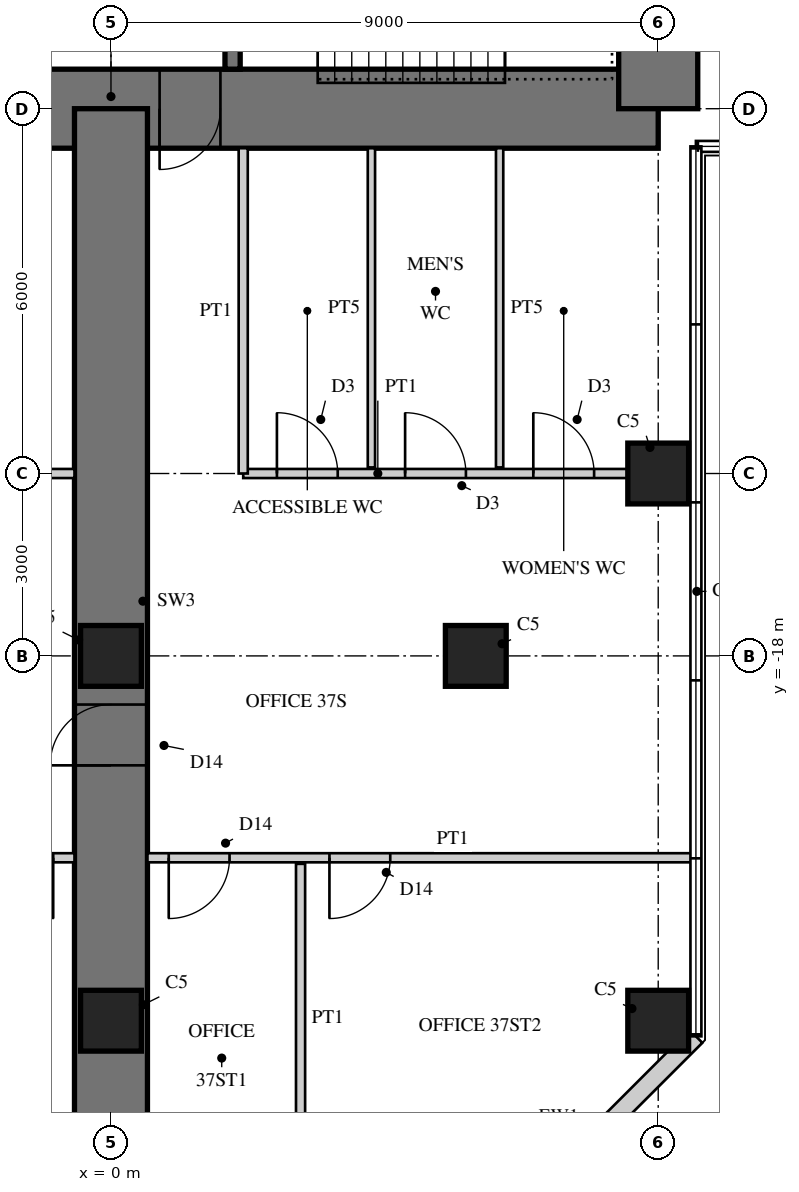
"""IFC4 building model, lengths in metres.
Left out: names, types, materials, properties, quantities, classifications, styles, units other than length and angle.
Written with IfcOpenShell. Run it as: python <this file> out.ifc"""

import sys

from ifc_helpers import new_model, si_unit, direction, frame, frame_2d, origin, origin_2d, place, context, subcontext, project, spatial, rectangle, extrude, element, fill, save


model = new_model("IFC4")
c1 = context("Model", 3, precision=1e-05, world=origin(), true_north=direction((0.0, 1.0)))
c2 = subcontext(c1, "Body", "Model", "MODEL_VIEW")
j1 = project(units=[si_unit("LENGTHUNIT", "METRE"), si_unit("PLANEANGLEUNIT", "RADIAN")], contexts=[c1])
p1 = place(None, origin())
s1 = spatial("IfcSite", under=j1, at=p1, CompositionType="ELEMENT")
p2 = place(p1, origin())
s2 = spatial("IfcBuilding", under=s1, at=p2, CompositionType="ELEMENT")
p3 = place(p2, frame((0.0, 0.0, 152.5)))
s3 = spatial("IfcBuildingStorey", under=s2, at=p3, CompositionType="ELEMENT", Elevation=152.5)
p4 = place(p3, frame((-9.0, -9.0, 0.0), z_axis=(0.0, 0.0, 1.0), x_axis=(1.0, 0.0, 0.0)))
e1 = element("IfcWall", 1, at=p4, inside=s3, PredefinedType="SHEAR", context=c2, shape_type="SweptSolid", body=[
    extrude(rectangle(XDim=18.0, YDim=1.3, at=frame_2d((9.0, 0.0))), origin(), (0.0, 0.0, 1.0), 4.0),
])
p5 = place(p4, frame((9.8, 0.0, 0.0)))
e2 = element("IfcOpeningElement", 2, at=p5, cuts=e1, PredefinedType="OPENING", context=c2, shape_type="SweptSolid", body=[
    extrude(rectangle(XDim=1.0, YDim=2.4, at=frame_2d((0.5, 1.2))), frame((0.0, 0.66, 0.0), z_axis=(0.0, -1.0, 0.0), x_axis=(1.0, 0.0, 0.0)), (0.0, 0.0, 1.0), 1.32),
])
p6 = place(p3, frame((9.0, -9.0, 0.0), z_axis=(0.0, 0.0, 1.0), x_axis=(0.0, 1.0, 0.0)))
e3 = element("IfcWall", 3, at=p6, inside=s3, PredefinedType="SHEAR", context=c2, shape_type="SweptSolid", body=[
    extrude(rectangle(XDim=18.0, YDim=1.3, at=frame_2d((9.0, 0.0))), origin(), (0.0, 0.0, 1.0), 4.0),
])
p7 = place(p6, frame((9.8, 0.0, 0.0)))
e4 = element("IfcOpeningElement", 4, at=p7, cuts=e3, PredefinedType="OPENING", context=c2, shape_type="SweptSolid", body=[
    extrude(rectangle(XDim=1.0, YDim=2.4, at=frame_2d((0.5, 1.2))), frame((0.0, 0.66, 0.0), z_axis=(0.0, -1.0, 0.0), x_axis=(1.0, 0.0, 0.0)), (0.0, 0.0, 1.0), 1.32),
])
p8 = place(p3, frame((2.0, -1.675, 0.0), z_axis=(0.0, 0.0, 1.0), x_axis=(0.0, -1.0, 0.0)))
e5 = element("IfcWall", 5, at=p8, inside=s3, PredefinedType="SHEAR", context=c2, shape_type="SweptSolid", body=[
    extrude(rectangle(XDim=6.675, YDim=0.25, at=frame_2d((3.337, 0.0))), origin(), (0.0, 0.0, 1.0), 4.0),
])
p9 = place(p8, frame((0.725, 0.0, 0.0)))
e6 = element("IfcOpeningElement", 6, at=p9, cuts=e5, PredefinedType="OPENING", context=c2, shape_type="SweptSolid", body=[
    extrude(rectangle(XDim=1.0, YDim=2.1, at=frame_2d((0.5, 1.05))), frame((0.0, 0.135, 0.0), z_axis=(0.0, -1.0, 0.0), x_axis=(1.0, 0.0, 0.0)), (0.0, 0.0, 1.0), 0.27),
])
p10 = place(p3, frame((0.0, -9.0, 0.0), z_axis=(0.0, 0.0, 1.0), x_axis=(0.0, -1.0, 0.0)))
e7 = element("IfcWall", 7, at=p10, inside=s3, PredefinedType="SHEAR", context=c2, shape_type="SweptSolid", body=[
    extrude(rectangle(XDim=18.0, YDim=1.2, at=frame_2d((9.0, 0.0))), origin(), (0.0, 0.0, 1.0), 4.0),
])
p11 = place(p10, frame((9.8, 0.0, 0.0)))
e8 = element("IfcOpeningElement", 8, at=p11, cuts=e7, PredefinedType="OPENING", context=c2, shape_type="SweptSolid", body=[
    extrude(rectangle(XDim=1.0, YDim=2.2, at=frame_2d((0.5, 1.1))), frame((0.0, 0.61, 0.0), z_axis=(0.0, -1.0, 0.0), x_axis=(1.0, 0.0, 0.0)), (0.0, 0.0, 1.0), 1.22),
])
for number, where, z_axis, x_axis in (
    (9, (9.0, -15.0, 0.0), (0.0, 0.0, 1.0), (1.0, 0.0, 0.0)),
    (10, (9.0, -24.0, 0.0), (0.0, 0.0, 1.0), (1.0, 0.0, 0.0)),
    (11, (0.0, -18.0, 0.0), (0.0, 0.0, 1.0), (1.0, 0.0, 0.0)),
    (12, (6.0, -18.0, 0.0), (0.0, 0.0, 1.0), (1.0, 0.0, 0.0)),
    (13, (0.0, -24.0, 0.0), (0.0, 0.0, 1.0), (1.0, 0.0, 0.0)),
):
    element("IfcColumn", number, at=place(p3, frame(where, z_axis=z_axis, x_axis=x_axis)), inside=s3, PredefinedType="COLUMN", context=c2, shape_type="SweptSolid", body=[
        extrude(rectangle(XDim=1.0, YDim=1.0, at=origin_2d()), origin(), (0.0, 0.0, 1.0), 4.0),
    ])
p12 = place(p3, frame((6.277, -27.6, 0.0), z_axis=(0.0, 0.0, 1.0), x_axis=(0.707106781187, 0.707106781187, 0.0)))
e14 = element("IfcWall", 14, at=p12, inside=s3, PredefinedType="SOLIDWALL", context=c2, shape_type="SweptSolid", body=[
    extrude(rectangle(XDim=4.728, YDim=0.3, at=frame_2d((2.364, 0.0))), origin(), (0.0, 0.0, 1.0), 3.8),
])
p13 = place(p12, frame((1.914, 0.0, 0.3)))
e15 = element("IfcOpeningElement", 15, at=p13, cuts=e14, PredefinedType="OPENING", context=c2, shape_type="SweptSolid", body=[
    extrude(rectangle(XDim=0.9, YDim=2.4, at=frame_2d((0.45, 1.2))), frame((0.0, 0.16, 0.0), z_axis=(0.0, -1.0, 0.0), x_axis=(1.0, 0.0, 0.0)), (0.0, 0.0, 1.0), 0.32),
])
p14 = place(p3, frame((2.175, -15.0, 0.0), z_axis=(0.0, 0.0, 1.0), x_axis=(1.0, 0.0, 0.0)))
e16 = element("IfcWall", 16, at=p14, inside=s3, PredefinedType="PARTITIONING", context=c2, shape_type="SweptSolid", body=[
    extrude(rectangle(XDim=6.325, YDim=0.15, at=frame_2d((3.163, 0.0))), origin(), (0.0, 0.0, 1.0), 3.0),
])
p15 = place(p14, frame((0.554, 0.0, 0.0)))
e17 = element("IfcOpeningElement", 17, at=p15, cuts=e16, PredefinedType="OPENING", context=c2, shape_type="SweptSolid", body=[
    extrude(rectangle(XDim=1.0, YDim=2.1, at=frame_2d((0.5, 1.05))), frame((0.0, 0.085, 0.0), z_axis=(0.0, -1.0, 0.0), x_axis=(1.0, 0.0, 0.0)), (0.0, 0.0, 1.0), 0.17),
])
p16 = place(p14, frame((2.663, 0.0, 0.0)))
e18 = element("IfcOpeningElement", 18, at=p16, cuts=e16, PredefinedType="OPENING", context=c2, shape_type="SweptSolid", body=[
    extrude(rectangle(XDim=1.0, YDim=2.1, at=frame_2d((0.5, 1.05))), frame((0.0, 0.085, 0.0), z_axis=(0.0, -1.0, 0.0), x_axis=(1.0, 0.0, 0.0)), (0.0, 0.0, 1.0), 0.17),
])
p17 = place(p14, frame((4.771, 0.0, 0.0)))
e19 = element("IfcOpeningElement", 19, at=p17, cuts=e16, PredefinedType="OPENING", context=c2, shape_type="SweptSolid", body=[
    extrude(rectangle(XDim=1.0, YDim=2.1, at=frame_2d((0.5, 1.05))), frame((0.0, 0.085, 0.0), z_axis=(0.0, -1.0, 0.0), x_axis=(1.0, 0.0, 0.0)), (0.0, 0.0, 1.0), 0.17),
])
p18 = place(p3, frame((2.175, -9.65, 0.0), z_axis=(0.0, 0.0, 1.0), x_axis=(0.0, -1.0, 0.0)))
e20 = element("IfcWall", 20, at=p18, inside=s3, PredefinedType="PARTITIONING", context=c2, shape_type="SweptSolid", body=[
    extrude(rectangle(XDim=5.35, YDim=0.15, at=frame_2d((2.675, 0.0))), origin(), (0.0, 0.0, 1.0), 3.8),
])
for number, where, z_axis, x_axis in (
    (21, (4.283, -9.65, 0.0), (0.0, 0.0, 1.0), (0.0, -1.0, 0.0)),
    (22, (6.392, -9.65, 0.0), (0.0, 0.0, 1.0), (0.0, -1.0, 0.0)),
):
    element("IfcWall", number, at=place(p3, frame(where, z_axis=z_axis, x_axis=x_axis)), inside=s3, PredefinedType="PLUMBINGWALL", context=c2, shape_type="SweptSolid", body=[
        extrude(rectangle(XDim=5.25, YDim=0.12, at=frame_2d((2.625, 0.0))), origin(), (0.0, 0.0, 1.0), 3.8),
    ])
p19 = place(p3, frame((-8.5, -15.0, 0.0), z_axis=(0.0, 0.0, 1.0), x_axis=(1.0, 0.0, 0.0)))
e23 = element("IfcWall", 23, at=p19, inside=s3, PredefinedType="PARTITIONING", context=c2, shape_type="SweptSolid", body=[
    extrude(rectangle(XDim=7.9, YDim=0.15, at=frame_2d((3.95, 0.0))), origin(), (0.0, 0.0, 1.0), 3.0),
])
p20 = place(p19, frame((1.45, 0.0, 0.0)))
e24 = element("IfcOpeningElement", 24, at=p20, cuts=e23, PredefinedType="OPENING", context=c2, shape_type="SweptSolid", body=[
    extrude(rectangle(XDim=1.0, YDim=2.1, at=frame_2d((0.5, 1.05))), frame((0.0, 0.085, 0.0), z_axis=(0.0, -1.0, 0.0), x_axis=(1.0, 0.0, 0.0)), (0.0, 0.0, 1.0), 0.17),
])
p21 = place(p19, frame((5.4, 0.0, 0.0)))
e25 = element("IfcOpeningElement", 25, at=p21, cuts=e23, PredefinedType="OPENING", context=c2, shape_type="SweptSolid", body=[
    extrude(rectangle(XDim=1.0, YDim=2.1, at=frame_2d((0.5, 1.05))), frame((0.0, 0.085, 0.0), z_axis=(0.0, -1.0, 0.0), x_axis=(1.0, 0.0, 0.0)), (0.0, 0.0, 1.0), 0.17),
])
p22 = place(p3, frame((3.118, -21.42, 0.0), z_axis=(0.0, 0.0, 1.0), x_axis=(0.0, -1.0, 0.0)))
e26 = element("IfcWall", 26, at=p22, inside=s3, PredefinedType="PARTITIONING", context=c2, shape_type="SweptSolid", body=[
    extrude(rectangle(XDim=5.08, YDim=0.15, at=frame_2d((2.54, 0.0))), origin(), (0.0, 0.0, 1.0), 3.8),
])
p23 = place(p3, frame((0.6, -21.32, 0.0), z_axis=(0.0, 0.0, 1.0), x_axis=(1.0, 0.0, 0.0)))
e27 = element("IfcWall", 27, at=p23, inside=s3, PredefinedType="PARTITIONING", context=c2, shape_type="SweptSolid", body=[
    extrude(rectangle(XDim=8.98, YDim=0.15, at=frame_2d((4.49, 0.0))), origin(), (0.0, 0.0, 1.0), 3.8),
])
p24 = place(p23, frame((0.35, 0.0, 0.0)))
e28 = element("IfcOpeningElement", 28, at=p24, cuts=e27, PredefinedType="OPENING", context=c2, shape_type="SweptSolid", body=[
    extrude(rectangle(XDim=1.0, YDim=2.2, at=frame_2d((0.5, 1.1))), frame((0.0, 0.085, 0.0), z_axis=(0.0, -1.0, 0.0), x_axis=(1.0, 0.0, 0.0)), (0.0, 0.0, 1.0), 0.17),
])
p25 = place(p23, frame((2.993, 0.0, 0.0)))
e29 = element("IfcOpeningElement", 29, at=p25, cuts=e27, PredefinedType="OPENING", context=c2, shape_type="SweptSolid", body=[
    extrude(rectangle(XDim=1.0, YDim=2.2, at=frame_2d((0.5, 1.1))), frame((0.0, 0.085, 0.0), z_axis=(0.0, -1.0, 0.0), x_axis=(1.0, 0.0, 0.0)), (0.0, 0.0, 1.0), 0.17),
])
p26 = place(p3, frame((-9.58, -21.32, 0.0), z_axis=(0.0, 0.0, 1.0), x_axis=(1.0, 0.0, 0.0)))
e30 = element("IfcWall", 30, at=p26, inside=s3, PredefinedType="PARTITIONING", context=c2, shape_type="SweptSolid", body=[
    extrude(rectangle(XDim=8.98, YDim=0.15, at=frame_2d((4.49, 0.0))), origin(), (0.0, 0.0, 1.0), 3.8),
])
p27 = place(p26, frame((4.987, 0.0, 0.0)))
e31 = element("IfcOpeningElement", 31, at=p27, cuts=e30, PredefinedType="OPENING", context=c2, shape_type="SweptSolid", body=[
    extrude(rectangle(XDim=1.0, YDim=2.2, at=frame_2d((0.5, 1.1))), frame((0.0, 0.085, 0.0), z_axis=(0.0, -1.0, 0.0), x_axis=(1.0, 0.0, 0.0)), (0.0, 0.0, 1.0), 0.17),
])
p28 = place(p26, frame((7.63, 0.0, 0.0)))
e32 = element("IfcOpeningElement", 32, at=p28, cuts=e30, PredefinedType="OPENING", context=c2, shape_type="SweptSolid", body=[
    extrude(rectangle(XDim=1.0, YDim=2.2, at=frame_2d((0.5, 1.1))), frame((0.0, 0.085, 0.0), z_axis=(0.0, -1.0, 0.0), x_axis=(1.0, 0.0, 0.0)), (0.0, 0.0, 1.0), 0.17),
])
p29 = place(p15, origin())
e33 = element("IfcDoor", 33, at=p29, inside=s3, OperationType="SINGLE_SWING_LEFT", PredefinedType="DOOR", context=c2, shape_type="SweptSolid", body=[
    extrude(rectangle(XDim=1.0, YDim=2.1, at=frame_2d((0.5, 1.05))), frame((0.0, 0.025, 0.0), z_axis=(0.0, -1.0, 0.0), x_axis=(1.0, 0.0, 0.0)), (0.0, 0.0, 1.0), 0.05),
])
fill(e17, e33)
p30 = place(p16, origin())
e34 = element("IfcDoor", 34, at=p30, inside=s3, OperationType="SINGLE_SWING_LEFT", PredefinedType="DOOR", context=c2, shape_type="SweptSolid", body=[
    extrude(rectangle(XDim=1.0, YDim=2.1, at=frame_2d((0.5, 1.05))), frame((0.0, 0.025, 0.0), z_axis=(0.0, -1.0, 0.0), x_axis=(1.0, 0.0, 0.0)), (0.0, 0.0, 1.0), 0.05),
])
fill(e18, e34)
p31 = place(p17, origin())
e35 = element("IfcDoor", 35, at=p31, inside=s3, OperationType="SINGLE_SWING_LEFT", PredefinedType="DOOR", context=c2, shape_type="SweptSolid", body=[
    extrude(rectangle(XDim=1.0, YDim=2.1, at=frame_2d((0.5, 1.05))), frame((0.0, 0.025, 0.0), z_axis=(0.0, -1.0, 0.0), x_axis=(1.0, 0.0, 0.0)), (0.0, 0.0, 1.0), 0.05),
])
fill(e19, e35)
p32 = place(p24, frame((1.0, 0.0, 0.0), z_axis=(0.0, 0.0, 1.0), x_axis=(-1.0, 0.0, 0.0)))
e36 = element("IfcDoor", 36, at=p32, inside=s3, OperationType="SINGLE_SWING_RIGHT", PredefinedType="DOOR", context=c2, shape_type="SweptSolid", body=[
    extrude(rectangle(XDim=1.0, YDim=2.2, at=frame_2d((0.5, 1.1))), frame((0.0, 0.025, 0.0), z_axis=(0.0, -1.0, 0.0), x_axis=(1.0, 0.0, 0.0)), (0.0, 0.0, 1.0), 0.05),
])
fill(e28, e36)
p33 = place(p25, frame((1.0, 0.0, 0.0), z_axis=(0.0, 0.0, 1.0), x_axis=(-1.0, 0.0, 0.0)))
e37 = element("IfcDoor", 37, at=p33, inside=s3, OperationType="SINGLE_SWING_RIGHT", PredefinedType="DOOR", context=c2, shape_type="SweptSolid", body=[
    extrude(rectangle(XDim=1.0, YDim=2.2, at=frame_2d((0.5, 1.1))), frame((0.0, 0.025, 0.0), z_axis=(0.0, -1.0, 0.0), x_axis=(1.0, 0.0, 0.0)), (0.0, 0.0, 1.0), 0.05),
])
fill(e29, e37)
p34 = place(p28, frame((1.0, 0.0, 0.0), z_axis=(0.0, 0.0, 1.0), x_axis=(-1.0, 0.0, 0.0)))
e38 = element("IfcDoor", 38, at=p34, inside=s3, OperationType="SINGLE_SWING_LEFT", PredefinedType="DOOR", context=c2, shape_type="SweptSolid", body=[
    extrude(rectangle(XDim=1.0, YDim=2.2, at=frame_2d((0.5, 1.1))), frame((0.0, 0.025, 0.0), z_axis=(0.0, -1.0, 0.0), x_axis=(1.0, 0.0, 0.0)), (0.0, 0.0, 1.0), 0.05),
])
fill(e32, e38)
p35 = place(p11, frame((1.0, 0.0, 0.0), z_axis=(0.0, 0.0, 1.0), x_axis=(-1.0, 0.0, 0.0)))
e39 = element("IfcDoor", 39, at=p35, inside=s3, OperationType="SINGLE_SWING_LEFT", PredefinedType="DOOR", context=c2, shape_type="SweptSolid", body=[
    extrude(rectangle(XDim=1.0, YDim=2.2, at=frame_2d((0.5, 1.1))), frame((0.0, 0.025, 0.0), z_axis=(0.0, -1.0, 0.0), x_axis=(1.0, 0.0, 0.0)), (0.0, 0.0, 1.0), 0.05),
])
fill(e8, e39)
p36 = place(p5, frame((1.0, 0.0, 0.0), z_axis=(0.0, 0.0, 1.0), x_axis=(-1.0, 0.0, 0.0)))
e40 = element("IfcDoor", 40, at=p36, inside=s3, OperationType="SINGLE_SWING_RIGHT", PredefinedType="DOOR", context=c2, shape_type="SweptSolid", body=[
    extrude(rectangle(XDim=1.0, YDim=2.4, at=frame_2d((0.5, 1.2))), frame((0.0, -0.005, 0.0), z_axis=(0.0, -1.0, 0.0), x_axis=(1.0, 0.0, 0.0)), (0.0, 0.0, 1.0), 0.05),
])
fill(e2, e40)
save(model, sys.argv[1])
